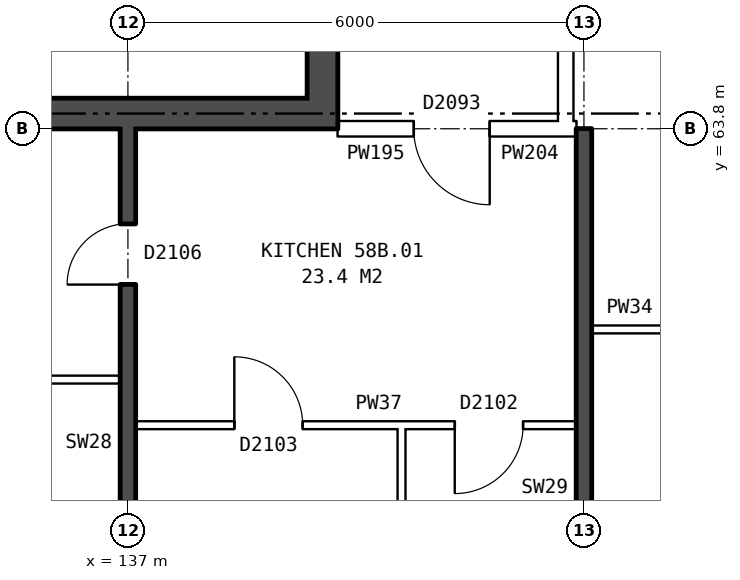
"""IFC4 building model, lengths in metres.
Left out: names, types, materials, properties, quantities, classifications, styles, units other than length and angle.
Written with IfcOpenShell. Run it as: python <this file> out.ifc"""

import sys

from ifc_helpers import new_model, si_unit, direction, frame, frame_2d, origin, place, context, subcontext, project, spatial, rectangle, extrude, element, fill, save


model = new_model("IFC4")
c1 = context("Model", 3, precision=1e-05, world=origin(), true_north=direction((0.0, 1.0)))
c2 = subcontext(c1, "Body", "Model", "MODEL_VIEW")
j1 = project(units=[si_unit("LENGTHUNIT", "METRE"), si_unit("PLANEANGLEUNIT", "RADIAN")], contexts=[c1])
p1 = place(None, origin())
s1 = spatial("IfcSite", under=j1, at=p1, CompositionType="ELEMENT")
p2 = place(p1, origin())
s2 = spatial("IfcBuilding", under=s1, at=p2, CompositionType="ELEMENT")
p3 = place(p2, frame((0.0, 0.0, 205.9)))
s3 = spatial("IfcBuildingStorey", under=s2, at=p3, CompositionType="ELEMENT", Elevation=205.9)
p4 = place(p3, frame((139.56, 63.8, 0.0), z_axis=(0.0, 0.0, 1.0), x_axis=(0.0, 1.0, 0.0)))
e1 = element("IfcWall", 1, at=p4, inside=s3, PredefinedType="SHEAR", context=c2, shape_type="SweptSolid", body=[
    extrude(rectangle(XDim=12.4, YDim=0.4, at=frame_2d((6.2, 0.0))), origin(), (0.0, 0.0, 1.0), 2.85),
])
p5 = place(p4, frame((1.325, 0.0, 0.0)))
e2 = element("IfcOpeningElement", 2, at=p5, cuts=e1, PredefinedType="OPENING", context=c2, shape_type="SweptSolid", body=[
    extrude(rectangle(XDim=1.1, YDim=2.1, at=frame_2d((0.55, 1.05))), frame((0.0, 0.21, 0.0), z_axis=(0.0, -1.0, 0.0), x_axis=(1.0, 0.0, 0.0)), (0.0, 0.0, 1.0), 0.42),
])
p6 = place(p4, frame((3.6, 0.0, 0.0)))
e3 = element("IfcOpeningElement", 3, at=p6, cuts=e1, PredefinedType="OPENING", context=c2, shape_type="SweptSolid", body=[
    extrude(rectangle(XDim=1.1, YDim=2.1, at=frame_2d((0.55, 1.05))), frame((0.0, 0.21, 0.0), z_axis=(0.0, -1.0, 0.0), x_axis=(1.0, 0.0, 0.0)), (0.0, 0.0, 1.0), 0.42),
])
p7 = place(p4, frame((5.8, 0.0, 0.0)))
e4 = element("IfcOpeningElement", 4, at=p7, cuts=e1, PredefinedType="OPENING", context=c2, shape_type="SweptSolid", body=[
    extrude(rectangle(XDim=1.1, YDim=2.1, at=frame_2d((0.55, 1.05))), frame((0.0, 0.21, 0.0), z_axis=(0.0, -1.0, 0.0), x_axis=(1.0, 0.0, 0.0)), (0.0, 0.0, 1.0), 0.42),
])
p8 = place(p4, frame((9.9, 0.0, 0.0)))
e5 = element("IfcOpeningElement", 5, at=p8, cuts=e1, PredefinedType="OPENING", context=c2, shape_type="SweptSolid", body=[
    extrude(rectangle(XDim=1.1, YDim=2.1, at=frame_2d((0.55, 1.05))), frame((0.0, 0.21, 0.0), z_axis=(0.0, -1.0, 0.0), x_axis=(1.0, 0.0, 0.0)), (0.0, 0.0, 1.0), 0.42),
])
p9 = place(p4, frame((8.125, 0.0, 0.0)))
e6 = element("IfcOpeningElement", 6, at=p9, cuts=e1, PredefinedType="OPENING", context=c2, shape_type="SweptSolid", body=[
    extrude(rectangle(XDim=0.85, YDim=2.1, at=frame_2d((0.425, 1.05))), frame((0.0, 0.21, 0.0), z_axis=(0.0, -1.0, 0.0), x_axis=(1.0, 0.0, 0.0)), (0.0, 0.0, 1.0), 0.42),
])
p10 = place(p3, frame((139.36, 64.0, 0.0), z_axis=(0.0, 0.0, 1.0), x_axis=(-1.0, 0.0, 0.0)))
e7 = element("IfcWall", 7, at=p10, inside=s3, PredefinedType="SHEAR", context=c2, shape_type="SweptSolid", body=[
    extrude(rectangle(XDim=7.6, YDim=0.4, at=frame_2d((3.8, 0.0))), origin(), (0.0, 0.0, 1.0), 2.85),
])
p11 = place(p3, frame((142.76, 63.9, 0.0), z_axis=(0.0, 0.0, 1.0), x_axis=(0.0, 1.0, 0.0)))
e8 = element("IfcWall", 8, at=p11, inside=s3, PredefinedType="PARTITIONING", context=c2, shape_type="SweptSolid", body=[
    extrude(rectangle(XDim=12.2, YDim=0.2, at=frame_2d((6.1, 0.0))), origin(), (0.0, 0.0, 1.0), 2.85),
])
p12 = place(p11, frame((5.1, 0.0, 0.0)))
e9 = element("IfcOpeningElement", 9, at=p12, cuts=e8, PredefinedType="OPENING", context=c2, shape_type="SweptSolid", body=[
    extrude(rectangle(XDim=2.0, YDim=2.1, at=frame_2d((1.0, 1.05))), frame((0.0, 0.11, 0.0), z_axis=(0.0, -1.0, 0.0), x_axis=(1.0, 0.0, 0.0)), (0.0, 0.0, 1.0), 0.22),
])
p13 = place(p3, frame((137.1, 59.9, 0.0), z_axis=(0.0, 0.0, 1.0), x_axis=(1.0, 0.0, 0.0)))
e10 = element("IfcWall", 10, at=p13, inside=s3, PredefinedType="PARTITIONING", context=c2, shape_type="SweptSolid", body=[
    extrude(rectangle(XDim=5.8, YDim=0.1, at=frame_2d((2.9, 0.0))), origin(), (0.0, 0.0, 1.0), 2.85),
])
p14 = place(p13, frame((1.3, 0.0, 0.0)))
e11 = element("IfcOpeningElement", 11, at=p14, cuts=e10, PredefinedType="OPENING", context=c2, shape_type="SweptSolid", body=[
    extrude(rectangle(XDim=0.9, YDim=2.1, at=frame_2d((0.45, 1.05))), frame((0.0, 0.06, 0.0), z_axis=(0.0, -1.0, 0.0), x_axis=(1.0, 0.0, 0.0)), (0.0, 0.0, 1.0), 0.12),
])
p15 = place(p13, frame((4.2, 0.0, 0.0)))
e12 = element("IfcOpeningElement", 12, at=p15, cuts=e10, PredefinedType="OPENING", context=c2, shape_type="SweptSolid", body=[
    extrude(rectangle(XDim=0.9, YDim=2.1, at=frame_2d((0.45, 1.05))), frame((0.0, 0.06, 0.0), z_axis=(0.0, -1.0, 0.0), x_axis=(1.0, 0.0, 0.0)), (0.0, 0.0, 1.0), 0.12),
])
p16 = place(p3, frame((131.1, 60.5, 0.0), z_axis=(0.0, 0.0, 1.0), x_axis=(1.0, 0.0, 0.0)))
e13 = element("IfcWall", 13, at=p16, inside=s3, PredefinedType="PARTITIONING", context=c2, shape_type="SweptSolid", body=[
    extrude(rectangle(XDim=5.8, YDim=0.1, at=frame_2d((2.9, 0.0))), origin(), (0.0, 0.0, 1.0), 2.85),
])
p17 = place(p3, frame((143.1, 61.16, 0.0), z_axis=(0.0, 0.0, 1.0), x_axis=(1.0, 0.0, 0.0)))
e14 = element("IfcWall", 14, at=p17, inside=s3, PredefinedType="PARTITIONING", context=c2, shape_type="SweptSolid", body=[
    extrude(rectangle(XDim=2.9, YDim=0.1, at=frame_2d((1.45, 0.0))), origin(), (0.0, 0.0, 1.0), 2.85),
])
p18 = place(p17, frame((1.0, 0.0, 0.0)))
e15 = element("IfcOpeningElement", 15, at=p18, cuts=e14, PredefinedType="OPENING", context=c2, shape_type="SweptSolid", body=[
    extrude(rectangle(XDim=0.9, YDim=2.1, at=frame_2d((0.45, 1.05))), frame((0.0, 0.06, 0.0), z_axis=(0.0, -1.0, 0.0), x_axis=(1.0, 0.0, 0.0)), (0.0, 0.0, 1.0), 0.12),
])
p19 = place(p3, frame((139.76, 63.8, 0.0), z_axis=(0.0, 0.0, 1.0), x_axis=(1.0, 0.0, 0.0)))
e16 = element("IfcWall", 16, at=p19, inside=s3, PredefinedType="PARTITIONING", context=c2, shape_type="SweptSolid", body=[
    extrude(rectangle(XDim=3.0, YDim=0.2, at=frame_2d((1.5, 0.0))), origin(), (0.0, 0.0, 1.0), 2.85),
])
p20 = place(p19, frame((1.0, 0.0, 0.0)))
e17 = element("IfcOpeningElement", 17, at=p20, cuts=e16, PredefinedType="OPENING", context=c2, shape_type="SweptSolid", body=[
    extrude(rectangle(XDim=1.0, YDim=2.1, at=frame_2d((0.5, 1.05))), frame((0.0, 0.11, 0.0), z_axis=(0.0, -1.0, 0.0), x_axis=(1.0, 0.0, 0.0)), (0.0, 0.0, 1.0), 0.22),
])
p21 = place(p3, frame((142.76, 63.8, 0.0), z_axis=(0.0, 0.0, 1.0), x_axis=(1.0, 0.0, 0.0)))
e18 = element("IfcWall", 18, at=p21, inside=s3, PredefinedType="PARTITIONING", context=c2, shape_type="SweptSolid", body=[
    extrude(rectangle(XDim=0.14, YDim=0.2, at=frame_2d((0.07, 0.0))), origin(), (0.0, 0.0, 1.0), 2.85),
])
p22 = place(p3, frame((137.0, 54.36, 0.0), z_axis=(0.0, 0.0, 1.0), x_axis=(0.0, 1.0, 0.0)))
e19 = element("IfcWall", 19, at=p22, inside=s3, PredefinedType="SOLIDWALL", context=c2, shape_type="SweptSolid", body=[
    extrude(rectangle(XDim=9.44, YDim=0.2, at=frame_2d((4.72, 0.0))), origin(), (0.0, 0.0, 1.0), 2.85),
])
p23 = place(p22, frame((2.32, 0.0, 0.0)))
e20 = element("IfcOpeningElement", 20, at=p23, cuts=e19, PredefinedType="OPENING", context=c2, shape_type="SweptSolid", body=[
    extrude(rectangle(XDim=0.9, YDim=2.1, at=frame_2d((0.45, 1.05))), frame((0.0, 0.11, 0.0), z_axis=(0.0, -1.0, 0.0), x_axis=(1.0, 0.0, 0.0)), (0.0, 0.0, 1.0), 0.22),
])
p24 = place(p22, frame((7.39, 0.0, 0.0)))
e21 = element("IfcOpeningElement", 21, at=p24, cuts=e19, PredefinedType="OPENING", context=c2, shape_type="SweptSolid", body=[
    extrude(rectangle(XDim=0.8, YDim=2.1, at=frame_2d((0.4, 1.05))), frame((0.0, 0.11, 0.0), z_axis=(0.0, -1.0, 0.0), x_axis=(1.0, 0.0, 0.0)), (0.0, 0.0, 1.0), 0.22),
])
p25 = place(p3, frame((140.6, 57.45, 0.0), z_axis=(0.0, 0.0, 1.0), x_axis=(0.0, 1.0, 0.0)))
e22 = element("IfcWall", 22, at=p25, inside=s3, PredefinedType="PARTITIONING", context=c2, shape_type="SweptSolid", body=[
    extrude(rectangle(XDim=2.4, YDim=0.1, at=frame_2d((1.2, 0.0))), origin(), (0.0, 0.0, 1.0), 2.85),
])
p26 = place(p3, frame((143.0, 54.36, 0.0), z_axis=(0.0, 0.0, 1.0), x_axis=(0.0, 1.0, 0.0)))
e23 = element("IfcWall", 23, at=p26, inside=s3, PredefinedType="SOLIDWALL", context=c2, shape_type="SweptSolid", body=[
    extrude(rectangle(XDim=9.44, YDim=0.2, at=frame_2d((4.72, 0.0))), origin(), (0.0, 0.0, 1.0), 2.85),
])
p27 = place(p20, frame((1.0, 0.0, 0.0), z_axis=(0.0, 0.0, 1.0), x_axis=(-1.0, 0.0, 0.0)))
e24 = element("IfcDoor", 24, at=p27, inside=s3, OperationType="SINGLE_SWING_LEFT", PredefinedType="DOOR", context=c2, shape_type="SweptSolid", body=[
    extrude(rectangle(XDim=1.0, YDim=2.1, at=frame_2d((0.5, 1.05))), frame((0.0, 0.025, 0.0), z_axis=(0.0, -1.0, 0.0), x_axis=(1.0, 0.0, 0.0)), (0.0, 0.0, 1.0), 0.05),
])
fill(e17, e24)
p28 = place(p14, origin())
e25 = element("IfcDoor", 25, at=p28, inside=s3, OperationType="SINGLE_SWING_LEFT", PredefinedType="DOOR", context=c2, shape_type="SweptSolid", body=[
    extrude(rectangle(XDim=0.9, YDim=2.1, at=frame_2d((0.45, 1.05))), frame((0.0, 0.025, 0.0), z_axis=(0.0, -1.0, 0.0), x_axis=(1.0, 0.0, 0.0)), (0.0, 0.0, 1.0), 0.05),
])
fill(e11, e25)
p29 = place(p24, origin())
e26 = element("IfcDoor", 26, at=p29, inside=s3, OperationType="SINGLE_SWING_LEFT", PredefinedType="DOOR", context=c2, shape_type="SweptSolid", body=[
    extrude(rectangle(XDim=0.8, YDim=2.1, at=frame_2d((0.4, 1.05))), frame((0.0, 0.025, 0.0), z_axis=(0.0, -1.0, 0.0), x_axis=(1.0, 0.0, 0.0)), (0.0, 0.0, 1.0), 0.05),
])
fill(e21, e26)
p30 = place(p15, frame((0.9, 0.0, 0.0), z_axis=(0.0, 0.0, 1.0), x_axis=(-1.0, 0.0, 0.0)))
e27 = element("IfcDoor", 27, at=p30, inside=s3, OperationType="SINGLE_SWING_RIGHT", PredefinedType="DOOR", context=c2, shape_type="SweptSolid", body=[
    extrude(rectangle(XDim=0.9, YDim=2.1, at=frame_2d((0.45, 1.05))), frame((0.0, 0.025, 0.0), z_axis=(0.0, -1.0, 0.0), x_axis=(1.0, 0.0, 0.0)), (0.0, 0.0, 1.0), 0.05),
])
fill(e12, e27)
save(model, sys.argv[1])
